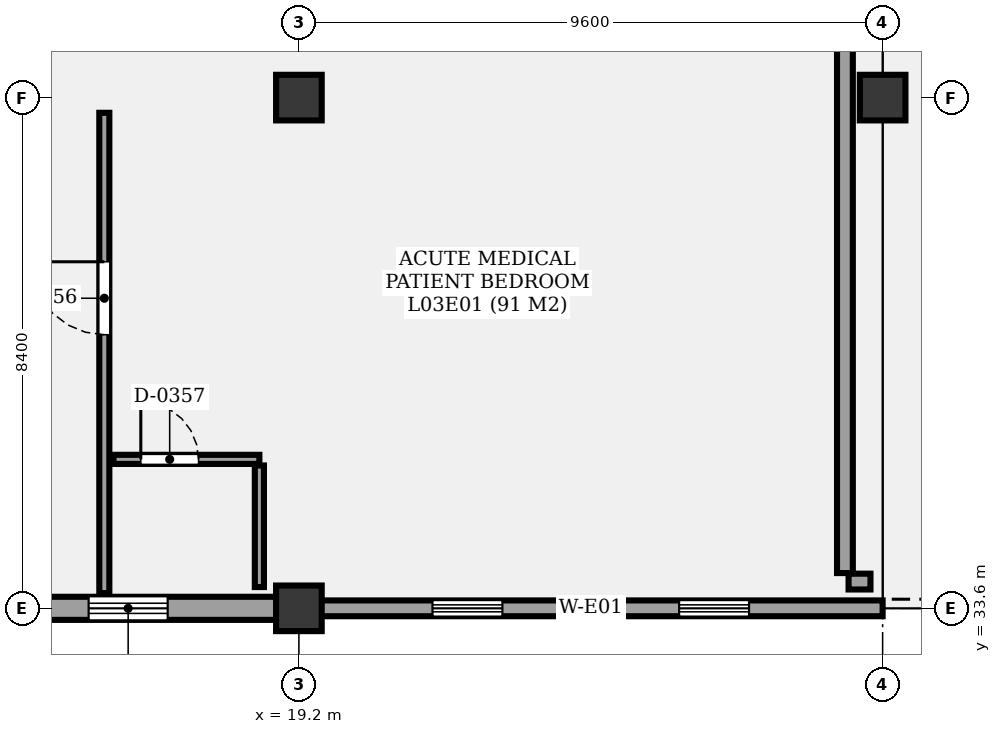
"""IFC4 building model, lengths in metres.
Left out: names, types, materials, properties, quantities, classifications, styles, units other than length and angle.
Written with IfcOpenShell. Run it as: python <this file> out.ifc"""

import sys

from ifc_helpers import new_model, si_unit, direction, frame, frame_2d, origin, origin_2d, place, context, subcontext, project, spatial, rectangle, extrude, element, fill, save


model = new_model("IFC4")
c1 = context("Model", 3, precision=1e-05, world=origin(), true_north=direction((0.0, 1.0)))
c2 = subcontext(c1, "Body", "Model", "MODEL_VIEW")
j1 = project(units=[si_unit("LENGTHUNIT", "METRE"), si_unit("PLANEANGLEUNIT", "RADIAN")], contexts=[c1])
p1 = place(None, origin())
s1 = spatial("IfcSite", under=j1, at=p1, CompositionType="ELEMENT")
p2 = place(p1, origin())
s2 = spatial("IfcBuilding", under=s1, at=p2, CompositionType="ELEMENT")
p3 = place(p2, frame((0.0, 0.0, 13.5)))
s3 = spatial("IfcBuildingStorey", under=s2, at=p3, CompositionType="ELEMENT", Elevation=13.5)
for number, where, z_axis, x_axis in (
    (1, (19.2, 33.6, 0.0), (0.0, 0.0, 1.0), (1.0, 0.0, 0.0)),
    (2, (19.2, 42.0, 0.0), (0.0, 0.0, 1.0), (1.0, 0.0, 0.0)),
    (3, (28.8, 42.0, 0.0), (0.0, 0.0, 1.0), (1.0, 0.0, 0.0)),
):
    element("IfcColumn", number, at=place(p3, frame(where, z_axis=z_axis, x_axis=x_axis)), inside=s3, PredefinedType="COLUMN", context=c2, shape_type="SweptSolid", body=[
        extrude(rectangle(XDim=0.75, YDim=0.75, at=origin_2d()), origin(), (0.0, 0.0, 1.0), 4.3),
    ])
p4 = place(p3, frame((19.2, 33.6, 0.0), z_axis=(0.0, 0.0, 1.0), x_axis=(-1.0, 0.0, 0.0)))
e4 = element("IfcWall", 4, at=p4, inside=s3, PredefinedType="SOLIDWALL", context=c2, shape_type="SweptSolid", body=[
    extrude(rectangle(XDim=9.6, YDim=0.38, at=frame_2d((4.8, 0.0))), origin(), (0.0, 0.0, 1.0), 3.49),
])
p5 = place(p4, frame((2.158, 0.0, 0.85)))
e5 = element("IfcOpeningElement", 5, at=p5, cuts=e4, PredefinedType="OPENING", context=c2, shape_type="SweptSolid", body=[
    extrude(rectangle(XDim=1.3, YDim=1.2, at=frame_2d((0.65, 0.6))), frame((0.0, 0.2, 0.0), z_axis=(0.0, -1.0, 0.0), x_axis=(1.0, 0.0, 0.0)), (0.0, 0.0, 1.0), 0.4),
])
p6 = place(p4, frame((6.142, 0.0, 0.85)))
e6 = element("IfcOpeningElement", 6, at=p6, cuts=e4, PredefinedType="OPENING", context=c2, shape_type="SweptSolid", body=[
    extrude(rectangle(XDim=1.3, YDim=1.2, at=frame_2d((0.65, 0.6))), frame((0.0, 0.2, 0.0), z_axis=(0.0, -1.0, 0.0), x_axis=(1.0, 0.0, 0.0)), (0.0, 0.0, 1.0), 0.4),
])
p7 = place(p3, frame((28.8, 33.6, 0.0), z_axis=(0.0, 0.0, 1.0), x_axis=(-1.0, 0.0, 0.0)))
e7 = element("IfcWall", 7, at=p7, inside=s3, PredefinedType="SOLIDWALL", context=c2, shape_type="SweptSolid", body=[
    extrude(rectangle(XDim=9.6, YDim=0.26, at=frame_2d((4.8, 0.0))), origin(), (0.0, 0.0, 1.0), 3.49),
])
p8 = place(p7, frame((2.197, 0.0, 0.85)))
e8 = element("IfcOpeningElement", 8, at=p8, cuts=e7, PredefinedType="OPENING", context=c2, shape_type="SweptSolid", body=[
    extrude(rectangle(XDim=1.15, YDim=1.2, at=frame_2d((0.575, 0.6))), frame((0.0, 0.14, 0.0), z_axis=(0.0, -1.0, 0.0), x_axis=(1.0, 0.0, 0.0)), (0.0, 0.0, 1.0), 0.28),
])
p9 = place(p7, frame((6.253, 0.0, 0.85)))
e9 = element("IfcOpeningElement", 9, at=p9, cuts=e7, PredefinedType="OPENING", context=c2, shape_type="SweptSolid", body=[
    extrude(rectangle(XDim=1.15, YDim=1.2, at=frame_2d((0.575, 0.6))), frame((0.0, 0.14, 0.0), z_axis=(0.0, -1.0, 0.0), x_axis=(1.0, 0.0, 0.0)), (0.0, 0.0, 1.0), 0.28),
])
p10 = place(p3, frame((28.6, 34.04, 0.0), z_axis=(0.0, 0.0, 1.0), x_axis=(-1.0, 0.0, 0.0)))
e10 = element("IfcWall", 10, at=p10, inside=s3, PredefinedType="SOLIDWALL", context=c2, shape_type="SweptSolid", body=[
    extrude(rectangle(XDim=0.36, YDim=0.26, at=frame_2d((0.18, 0.0))), origin(), (0.0, 0.0, 1.0), 3.49),
])
p11 = place(p3, frame((28.18, 43.8, 0.0), z_axis=(0.0, 0.0, 1.0), x_axis=(0.0, -1.0, 0.0)))
e11 = element("IfcWall", 11, at=p11, inside=s3, PredefinedType="SOLIDWALL", context=c2, shape_type="SweptSolid", body=[
    extrude(rectangle(XDim=9.62, YDim=0.26, at=frame_2d((4.81, 0.0))), origin(), (0.0, 0.0, 1.0), 3.49),
])
p12 = place(p3, frame((16.0, 33.85, 0.0), z_axis=(0.0, 0.0, 1.0), x_axis=(0.0, 1.0, 0.0)))
e12 = element("IfcWall", 12, at=p12, inside=s3, PredefinedType="PARTITIONING", context=c2, shape_type="SweptSolid", body=[
    extrude(rectangle(XDim=7.9, YDim=0.165, at=frame_2d((3.95, 0.0))), origin(), (0.0, 0.0, 1.0), 3.4),
])
p13 = place(p12, frame((4.25, 0.0, 0.0)))
e13 = element("IfcOpeningElement", 13, at=p13, cuts=e12, PredefinedType="OPENING", context=c2, shape_type="SweptSolid", body=[
    extrude(rectangle(XDim=1.2, YDim=2.2, at=frame_2d((0.6, 1.1))), frame((0.0, 0.093, 0.0), z_axis=(0.0, -1.0, 0.0), x_axis=(1.0, 0.0, 0.0)), (0.0, 0.0, 1.0), 0.185),
])
p14 = place(p3, frame((16.15, 36.05, 0.0), z_axis=(0.0, 0.0, 1.0), x_axis=(1.0, 0.0, 0.0)))
e14 = element("IfcWall", 14, at=p14, inside=s3, PredefinedType="PARTITIONING", context=c2, shape_type="SweptSolid", body=[
    extrude(rectangle(XDim=2.4, YDim=0.15, at=frame_2d((1.2, 0.0))), origin(), (0.0, 0.0, 1.0), 3.4),
])
p15 = place(p14, frame((0.45, 0.0, 0.0)))
e15 = element("IfcOpeningElement", 15, at=p15, cuts=e14, PredefinedType="OPENING", context=c2, shape_type="SweptSolid", body=[
    extrude(rectangle(XDim=0.95, YDim=2.1, at=frame_2d((0.475, 1.05))), frame((0.0, 0.085, 0.0), z_axis=(0.0, -1.0, 0.0), x_axis=(1.0, 0.0, 0.0)), (0.0, 0.0, 1.0), 0.17),
])
p16 = place(p3, frame((18.55, 33.95, 0.0), z_axis=(0.0, 0.0, 1.0), x_axis=(0.0, 1.0, 0.0)))
e16 = element("IfcWall", 16, at=p16, inside=s3, PredefinedType="PARTITIONING", context=c2, shape_type="SweptSolid", body=[
    extrude(rectangle(XDim=2.0, YDim=0.15, at=frame_2d((1.0, 0.0))), origin(), (0.0, 0.0, 1.0), 3.4),
])
p17 = place(p5, origin())
e17 = element("IfcWindow", 17, at=p17, inside=s3, PartitioningType="SINGLE_PANEL", PredefinedType="WINDOW", context=c2, shape_type="SweptSolid", body=[
    extrude(rectangle(XDim=1.3, YDim=1.2, at=frame_2d((0.65, 0.6))), frame((0.0, 0.03, 0.0), z_axis=(0.0, -1.0, 0.0), x_axis=(1.0, 0.0, 0.0)), (0.0, 0.0, 1.0), 0.06),
])
fill(e5, e17)
p18 = place(p8, origin())
e18 = element("IfcWindow", 18, at=p18, inside=s3, PartitioningType="SINGLE_PANEL", PredefinedType="WINDOW", context=c2, shape_type="SweptSolid", body=[
    extrude(rectangle(XDim=1.15, YDim=1.2, at=frame_2d((0.575, 0.6))), frame((0.0, 0.03, 0.0), z_axis=(0.0, -1.0, 0.0), x_axis=(1.0, 0.0, 0.0)), (0.0, 0.0, 1.0), 0.06),
])
fill(e8, e18)
p19 = place(p9, origin())
e19 = element("IfcWindow", 19, at=p19, inside=s3, PartitioningType="SINGLE_PANEL", PredefinedType="WINDOW", context=c2, shape_type="SweptSolid", body=[
    extrude(rectangle(XDim=1.15, YDim=1.2, at=frame_2d((0.575, 0.6))), frame((0.0, 0.03, 0.0), z_axis=(0.0, -1.0, 0.0), x_axis=(1.0, 0.0, 0.0)), (0.0, 0.0, 1.0), 0.06),
])
fill(e9, e19)
p20 = place(p13, origin())
e20 = element("IfcDoor", 20, at=p20, inside=s3, OperationType="SINGLE_SWING_RIGHT", PredefinedType="DOOR", context=c2, shape_type="SweptSolid", body=[
    extrude(rectangle(XDim=1.2, YDim=2.2, at=frame_2d((0.6, 1.1))), frame((0.0, 0.025, 0.0), z_axis=(0.0, -1.0, 0.0), x_axis=(1.0, 0.0, 0.0)), (0.0, 0.0, 1.0), 0.05),
])
fill(e13, e20)
p21 = place(p15, origin())
e21 = element("IfcDoor", 21, at=p21, inside=s3, OperationType="SINGLE_SWING_LEFT", PredefinedType="DOOR", context=c2, shape_type="SweptSolid", body=[
    extrude(rectangle(XDim=0.95, YDim=2.1, at=frame_2d((0.475, 1.05))), frame((0.0, 0.025, 0.0), z_axis=(0.0, -1.0, 0.0), x_axis=(1.0, 0.0, 0.0)), (0.0, 0.0, 1.0), 0.05),
])
fill(e15, e21)
save(model, sys.argv[1])
